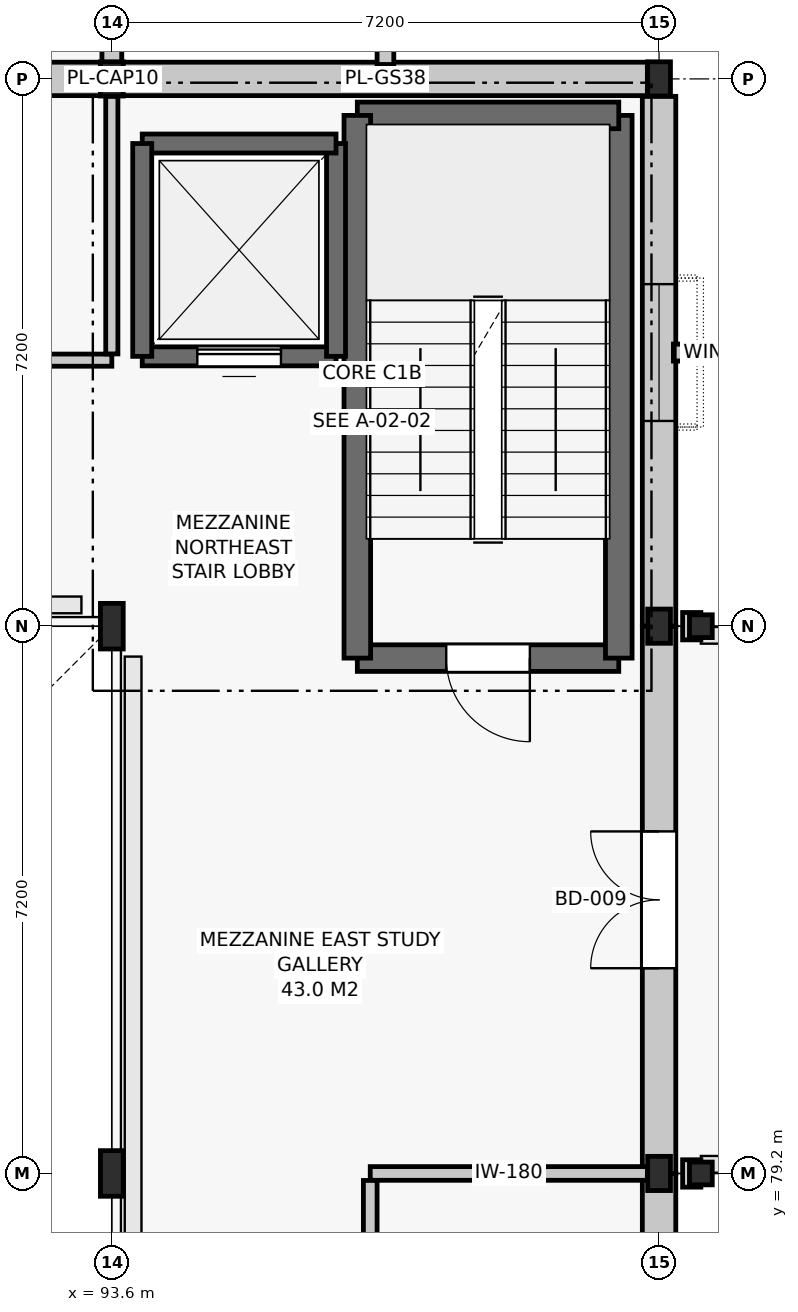
"""IFC4 building model, lengths in metres.
Left out: names, types, materials, properties, quantities, classifications, styles, units other than length and angle.
Written with IfcOpenShell. Run it as: python <this file> out.ifc"""

import sys

from ifc_helpers import new_model, si_unit, direction, frame, frame_2d, origin, origin_2d, place, context, subcontext, project, spatial, rectangle, i_section, extrude, element, fill, save


model = new_model("IFC4")
c1 = context("Model", 3, precision=1e-05, world=origin(), true_north=direction((0.0, 1.0)))
c2 = subcontext(c1, "Body", "Model", "MODEL_VIEW")
j1 = project(units=[si_unit("LENGTHUNIT", "METRE"), si_unit("PLANEANGLEUNIT", "RADIAN")], contexts=[c1])
p1 = place(None, origin())
s1 = spatial("IfcSite", under=j1, at=p1, CompositionType="ELEMENT")
p2 = place(p1, origin())
s2 = spatial("IfcBuilding", under=s1, at=p2, CompositionType="ELEMENT")
p3 = place(p2, frame((0.0, 0.0, 10.2)))
s3 = spatial("IfcBuildingStorey", under=s2, at=p3, CompositionType="ELEMENT", Elevation=10.2)
for number, where, z_axis, x_axis in (
    (1, (93.6, 79.2, 0.0), (0.0, 0.0, 1.0), (1.0, 0.0, 0.0)),
    (2, (93.6, 86.4, 0.0), (0.0, 0.0, 1.0), (1.0, 0.0, 0.0)),
):
    element("IfcColumn", number, at=place(p3, frame(where, z_axis=z_axis, x_axis=x_axis)), inside=s3, PredefinedType="COLUMN", context=c2, shape_type="SweptSolid", body=[
        extrude(i_section(OverallWidth=0.3, OverallDepth=0.6, WebThickness=0.015, FlangeThickness=0.03, FilletRadius=0.027, at=origin_2d()), origin(), (0.0, 0.0, 1.0), 4.2),
    ])
for number, where, z_axis, x_axis in (
    (3, (93.6, 93.6, 0.0), (0.0, 0.0, 1.0), (1.0, 0.0, 0.0)),
    (4, (100.8, 79.2, 0.0), (0.0, 0.0, 1.0), (1.0, 0.0, 0.0)),
    (5, (100.8, 86.4, 0.0), (0.0, 0.0, 1.0), (1.0, 0.0, 0.0)),
    (6, (100.8, 93.6, 0.0), (0.0, 0.0, 1.0), (1.0, 0.0, 0.0)),
):
    element("IfcColumn", number, at=place(p3, frame(where, z_axis=z_axis, x_axis=x_axis)), inside=s3, PredefinedType="COLUMN", context=c2, shape_type="SweptSolid", body=[
        extrude(i_section(OverallWidth=0.3, OverallDepth=0.45, WebThickness=0.014, FlangeThickness=0.026, FilletRadius=0.027, at=origin_2d()), origin(), (0.0, 0.0, 1.0), 4.2),
    ])
for number, where, z_axis, x_axis in (
    (7, (101.35, 79.2, 0.0), (0.0, 0.0, 1.0), (1.0, 0.0, 0.0)),
    (8, (101.35, 86.4, 0.0), (0.0, 0.0, 1.0), (1.0, 0.0, 0.0)),
):
    element("IfcColumn", number, at=place(p3, frame(where, z_axis=z_axis, x_axis=x_axis)), inside=s3, PredefinedType="COLUMN", context=c2, shape_type="SweptSolid", body=[
        extrude(i_section(OverallWidth=0.3, OverallDepth=0.3, WebThickness=0.011, FlangeThickness=0.019, FilletRadius=0.027, at=origin_2d()), origin(), (0.0, 0.0, 1.0), 4.2),
    ])
p4 = place(p3, frame((100.8, 72.0, 0.0), z_axis=(0.0, 0.0, 1.0), x_axis=(0.0, 1.0, 0.0)))
e9 = element("IfcWall", 9, at=p4, inside=s3, PredefinedType="SOLIDWALL", context=c2, shape_type="SweptSolid", body=[
    extrude(rectangle(XDim=7.2, YDim=0.44, at=frame_2d((3.6, 0.0))), origin(), (0.0, 0.0, 1.0), 3.2),
])
p5 = place(p4, frame((2.7, 0.0, 0.95)))
e10 = element("IfcOpeningElement", 10, at=p5, cuts=e9, PredefinedType="OPENING", context=c2, shape_type="SweptSolid", body=[
    extrude(rectangle(XDim=1.8, YDim=2.05, at=frame_2d((0.9, 1.025))), frame((0.0, 0.232, 0.0), z_axis=(0.0, -1.0, 0.0), x_axis=(1.0, 0.0, 0.0)), (0.0, 0.0, 1.0), 0.464),
])
p6 = place(p3, frame((100.8, 79.2, 0.0), z_axis=(0.0, 0.0, 1.0), x_axis=(0.0, 1.0, 0.0)))
e11 = element("IfcWall", 11, at=p6, inside=s3, PredefinedType="SOLIDWALL", context=c2, shape_type="SweptSolid", body=[
    extrude(rectangle(XDim=7.2, YDim=0.44, at=frame_2d((3.6, 0.0))), origin(), (0.0, 0.0, 1.0), 3.2),
])
p7 = place(p6, frame((2.7, 0.0, 0.0)))
e12 = element("IfcOpeningElement", 12, at=p7, cuts=e11, PredefinedType="OPENING", context=c2, shape_type="SweptSolid", body=[
    extrude(rectangle(XDim=1.8, YDim=2.3, at=frame_2d((0.9, 1.15))), frame((0.0, 0.232, 0.0), z_axis=(0.0, -1.0, 0.0), x_axis=(1.0, 0.0, 0.0)), (0.0, 0.0, 1.0), 0.464),
])
p8 = place(p3, frame((100.8, 86.4, 0.0), z_axis=(0.0, 0.0, 1.0), x_axis=(0.0, 1.0, 0.0)))
e13 = element("IfcWall", 13, at=p8, inside=s3, PredefinedType="SOLIDWALL", context=c2, shape_type="SweptSolid", body=[
    extrude(rectangle(XDim=6.971, YDim=0.44, at=frame_2d((3.486, 0.0))), origin(), (0.0, 0.0, 1.0), 3.2),
])
p9 = place(p8, frame((2.7, 0.0, 0.95)))
e14 = element("IfcOpeningElement", 14, at=p9, cuts=e13, PredefinedType="OPENING", context=c2, shape_type="SweptSolid", body=[
    extrude(rectangle(XDim=1.8, YDim=2.05, at=frame_2d((0.9, 1.025))), frame((0.0, 0.232, 0.0), z_axis=(0.0, -1.0, 0.0), x_axis=(1.0, 0.0, 0.0)), (0.0, 0.0, 1.0), 0.464),
])
p10 = place(p3, frame((100.646, 93.6, 0.0), z_axis=(0.0, 0.0, 1.0), x_axis=(-1.0, 0.0, 0.0)))
e15 = element("IfcWall", 15, at=p10, inside=s3, PredefinedType="SOLIDWALL", context=c2, shape_type="SweptSolid", body=[
    extrude(rectangle(XDim=7.046, YDim=0.44, at=frame_2d((3.523, 0.0))), origin(), (0.0, 0.0, 1.0), 3.2),
])
p11 = place(p3, frame((93.6, 93.6, 0.0), z_axis=(0.0, 0.0, 1.0), x_axis=(-1.0, 0.0, 0.0)))
e16 = element("IfcWall", 16, at=p11, inside=s3, PredefinedType="SOLIDWALL", context=c2, shape_type="SweptSolid", body=[
    extrude(rectangle(XDim=7.2, YDim=0.44, at=frame_2d((3.6, 0.0))), origin(), (0.0, 0.0, 1.0), 3.2),
])
p12 = place(p11, frame((2.7, 0.0, 0.95)))
e17 = element("IfcOpeningElement", 17, at=p12, cuts=e16, PredefinedType="OPENING", context=c2, shape_type="SweptSolid", body=[
    extrude(rectangle(XDim=1.8, YDim=2.05, at=frame_2d((0.9, 1.025))), frame((0.0, 0.232, 0.0), z_axis=(0.0, -1.0, 0.0), x_axis=(1.0, 0.0, 0.0)), (0.0, 0.0, 1.0), 0.464),
])
p13 = place(p3, frame((93.6, 93.6, 0.0), z_axis=(0.0, 0.0, 1.0), x_axis=(0.0, 1.0, 0.0)))
e18 = element("IfcWall", 18, at=p13, inside=s3, PredefinedType="PARAPET", context=c2, shape_type="SweptSolid", body=[
    extrude(rectangle(XDim=7.2, YDim=0.26, at=frame_2d((3.6, 0.0))), origin(), (0.0, 0.0, 1.0), 0.95),
])
p14 = place(p3, frame((96.83, 85.98, 0.0), z_axis=(0.0, 0.0, 1.0), x_axis=(1.0, 0.0, 0.0)))
e19 = element("IfcWall", 19, at=p14, inside=s3, PredefinedType="SHEAR", context=c2, shape_type="SweptSolid", body=[
    extrude(rectangle(XDim=3.44, YDim=0.35, at=frame_2d((1.72, 0.0))), origin(), (0.0, 0.0, 1.0), 3.92),
])
p15 = place(p14, frame((1.17, 0.0, 0.0)))
e20 = element("IfcOpeningElement", 20, at=p15, cuts=e19, PredefinedType="OPENING", context=c2, shape_type="SweptSolid", body=[
    extrude(rectangle(XDim=1.1, YDim=2.15, at=frame_2d((0.55, 1.075))), frame((0.0, 0.187, 0.0), z_axis=(0.0, -1.0, 0.0), x_axis=(1.0, 0.0, 0.0)), (0.0, 0.0, 1.0), 0.374),
])
p16 = place(p3, frame((100.27, 85.98, 0.0), z_axis=(0.0, 0.0, 1.0), x_axis=(0.0, 1.0, 0.0)))
e21 = element("IfcWall", 21, at=p16, inside=s3, PredefinedType="SHEAR", context=c2, shape_type="SweptSolid", body=[
    extrude(rectangle(XDim=7.14, YDim=0.35, at=frame_2d((3.57, 0.0))), origin(), (0.0, 0.0, 1.0), 3.92),
])
p17 = place(p3, frame((100.27, 93.12, 0.0), z_axis=(0.0, 0.0, 1.0), x_axis=(-1.0, 0.0, 0.0)))
e22 = element("IfcWall", 22, at=p17, inside=s3, PredefinedType="SHEAR", context=c2, shape_type="SweptSolid", body=[
    extrude(rectangle(XDim=3.44, YDim=0.35, at=frame_2d((1.72, 0.0))), origin(), (0.0, 0.0, 1.0), 3.92),
])
p18 = place(p3, frame((96.83, 93.12, 0.0), z_axis=(0.0, 0.0, 1.0), x_axis=(0.0, -1.0, 0.0)))
e23 = element("IfcWall", 23, at=p18, inside=s3, PredefinedType="SHEAR", context=c2, shape_type="SweptSolid", body=[
    extrude(rectangle(XDim=7.14, YDim=0.35, at=frame_2d((3.57, 0.0))), origin(), (0.0, 0.0, 1.0), 3.92),
])
p19 = place(p3, frame((94.0, 89.95, 0.0), z_axis=(0.0, 0.0, 1.0), x_axis=(1.0, 0.0, 0.0)))
e24 = element("IfcWall", 24, at=p19, inside=s3, PredefinedType="SHEAR", context=c2, shape_type="SweptSolid", body=[
    extrude(rectangle(XDim=2.55, YDim=0.25, at=frame_2d((1.275, 0.0))), origin(), (0.0, 0.0, 1.0), 3.92),
])
p20 = place(p19, frame((0.725, 0.0, 0.0)))
e25 = element("IfcOpeningElement", 25, at=p20, cuts=e24, PredefinedType="OPENING", context=c2, shape_type="SweptSolid", body=[
    extrude(rectangle(XDim=1.1, YDim=2.1, at=frame_2d((0.55, 1.05))), frame((0.0, 0.137, 0.0), z_axis=(0.0, -1.0, 0.0), x_axis=(1.0, 0.0, 0.0)), (0.0, 0.0, 1.0), 0.274),
])
p21 = place(p3, frame((96.55, 89.95, 0.0), z_axis=(0.0, 0.0, 1.0), x_axis=(0.0, 1.0, 0.0)))
e26 = element("IfcWall", 26, at=p21, inside=s3, PredefinedType="SHEAR", context=c2, shape_type="SweptSolid", body=[
    extrude(rectangle(XDim=2.8, YDim=0.25, at=frame_2d((1.4, 0.0))), origin(), (0.0, 0.0, 1.0), 3.92),
])
p22 = place(p3, frame((96.55, 92.75, 0.0), z_axis=(0.0, 0.0, 1.0), x_axis=(-1.0, 0.0, 0.0)))
e27 = element("IfcWall", 27, at=p22, inside=s3, PredefinedType="SHEAR", context=c2, shape_type="SweptSolid", body=[
    extrude(rectangle(XDim=2.55, YDim=0.25, at=frame_2d((1.275, 0.0))), origin(), (0.0, 0.0, 1.0), 3.92),
])
p23 = place(p3, frame((94.0, 92.75, 0.0), z_axis=(0.0, 0.0, 1.0), x_axis=(0.0, -1.0, 0.0)))
e28 = element("IfcWall", 28, at=p23, inside=s3, PredefinedType="SHEAR", context=c2, shape_type="SweptSolid", body=[
    extrude(rectangle(XDim=2.8, YDim=0.25, at=frame_2d((1.4, 0.0))), origin(), (0.0, 0.0, 1.0), 3.92),
])
p24 = place(p3, frame((97.0, 79.2, 0.0), z_axis=(0.0, 0.0, 1.0), x_axis=(1.0, 0.0, 0.0)))
e29 = element("IfcWall", 29, at=p24, inside=s3, PredefinedType="PARTITIONING", context=c2, shape_type="SweptSolid", body=[
    extrude(rectangle(XDim=3.646, YDim=0.18, at=frame_2d((1.823, 0.0))), origin(), (0.0, 0.0, 1.0), 3.545),
])
p25 = place(p3, frame((69.202, 89.9, 0.0), z_axis=(0.0, 0.0, 1.0), x_axis=(1.0, 0.0, 0.0)))
e30 = element("IfcWall", 30, at=p25, inside=s3, PredefinedType="PARTITIONING", context=c2, shape_type="SweptSolid", body=[
    extrude(rectangle(XDim=24.398, YDim=0.16, at=frame_2d((12.199, 0.0))), origin(), (0.0, 0.0, 1.0), 3.541),
])
p26 = place(p25, frame((11.699, 0.0, 0.0)))
e31 = element("IfcOpeningElement", 31, at=p26, cuts=e30, PredefinedType="OPENING", context=c2, shape_type="SweptSolid", body=[
    extrude(rectangle(XDim=1.0, YDim=2.15, at=frame_2d((0.5, 1.075))), frame((0.0, 0.092, 0.0), z_axis=(0.0, -1.0, 0.0), x_axis=(1.0, 0.0, 0.0)), (0.0, 0.0, 1.0), 0.184),
])
p27 = place(p3, frame((97.0, 61.282, 0.0), z_axis=(0.0, 0.0, 1.0), x_axis=(0.0, 1.0, 0.0)))
e32 = element("IfcWall", 32, at=p27, inside=s3, PredefinedType="PARTITIONING", context=c2, shape_type="SweptSolid", body=[
    extrude(rectangle(XDim=17.826, YDim=0.18, at=frame_2d((8.913, 0.0))), origin(), (0.0, 0.0, 1.0), 3.545),
])
p28 = place(p27, frame((9.727, 0.0, 0.0)))
e33 = element("IfcOpeningElement", 33, at=p28, cuts=e32, PredefinedType="OPENING", context=c2, shape_type="SweptSolid", body=[
    extrude(rectangle(XDim=1.65, YDim=2.25, at=frame_2d((0.825, 1.125))), frame((0.0, 0.102, 0.0), z_axis=(0.0, -1.0, 0.0), x_axis=(1.0, 0.0, 0.0)), (0.0, 0.0, 1.0), 0.204),
])
p29 = place(p3, frame((93.6, 89.982, 0.0), z_axis=(0.0, 0.0, 1.0), x_axis=(0.0, 1.0, 0.0)))
e34 = element("IfcWall", 34, at=p29, inside=s3, PredefinedType="PARTITIONING", context=c2, shape_type="SweptSolid", body=[
    extrude(rectangle(XDim=3.389, YDim=0.16, at=frame_2d((1.695, 0.0))), origin(), (0.0, 0.0, 1.0), 3.555),
])
p30 = place(p7, origin())
e35 = element("IfcDoor", 35, at=p30, inside=s3, OperationType="DOUBLE_DOOR_SINGLE_SWING", PredefinedType="DOOR", context=c2, shape_type="SweptSolid", body=[
    extrude(rectangle(XDim=1.8, YDim=2.3, at=frame_2d((0.9, 1.15))), frame((0.0, 0.025, 0.0), z_axis=(0.0, -1.0, 0.0), x_axis=(1.0, 0.0, 0.0)), (0.0, 0.0, 1.0), 0.05),
])
fill(e12, e35)
p31 = place(p9, origin())
e36 = element("IfcWindow", 36, at=p31, inside=s3, PartitioningType="SINGLE_PANEL", PredefinedType="WINDOW", context=c2, shape_type="SweptSolid", body=[
    extrude(rectangle(XDim=1.8, YDim=2.05, at=frame_2d((0.9, 1.025))), frame((0.0, 0.03, 0.0), z_axis=(0.0, -1.0, 0.0), x_axis=(1.0, 0.0, 0.0)), (0.0, 0.0, 1.0), 0.06),
])
fill(e14, e36)
p32 = place(p15, frame((1.1, 0.0, 0.0), z_axis=(0.0, 0.0, 1.0), x_axis=(-1.0, 0.0, 0.0)))
e37 = element("IfcDoor", 37, at=p32, inside=s3, OperationType="SINGLE_SWING_LEFT", PredefinedType="DOOR", context=c2, shape_type="SweptSolid", body=[
    extrude(rectangle(XDim=1.1, YDim=2.15, at=frame_2d((0.55, 1.075))), frame((0.0, 0.025, 0.0), z_axis=(0.0, -1.0, 0.0), x_axis=(1.0, 0.0, 0.0)), (0.0, 0.0, 1.0), 0.05),
])
fill(e20, e37)
p33 = place(p20, origin())
e38 = element("IfcDoor", 38, at=p33, inside=s3, OperationType="SLIDING_TO_LEFT", PredefinedType="DOOR", context=c2, shape_type="SweptSolid", body=[
    extrude(rectangle(XDim=1.1, YDim=2.1, at=frame_2d((0.55, 1.05))), frame((0.0, 0.025, 0.0), z_axis=(0.0, -1.0, 0.0), x_axis=(1.0, 0.0, 0.0)), (0.0, 0.0, 1.0), 0.05),
])
fill(e25, e38)
save(model, sys.argv[1])
